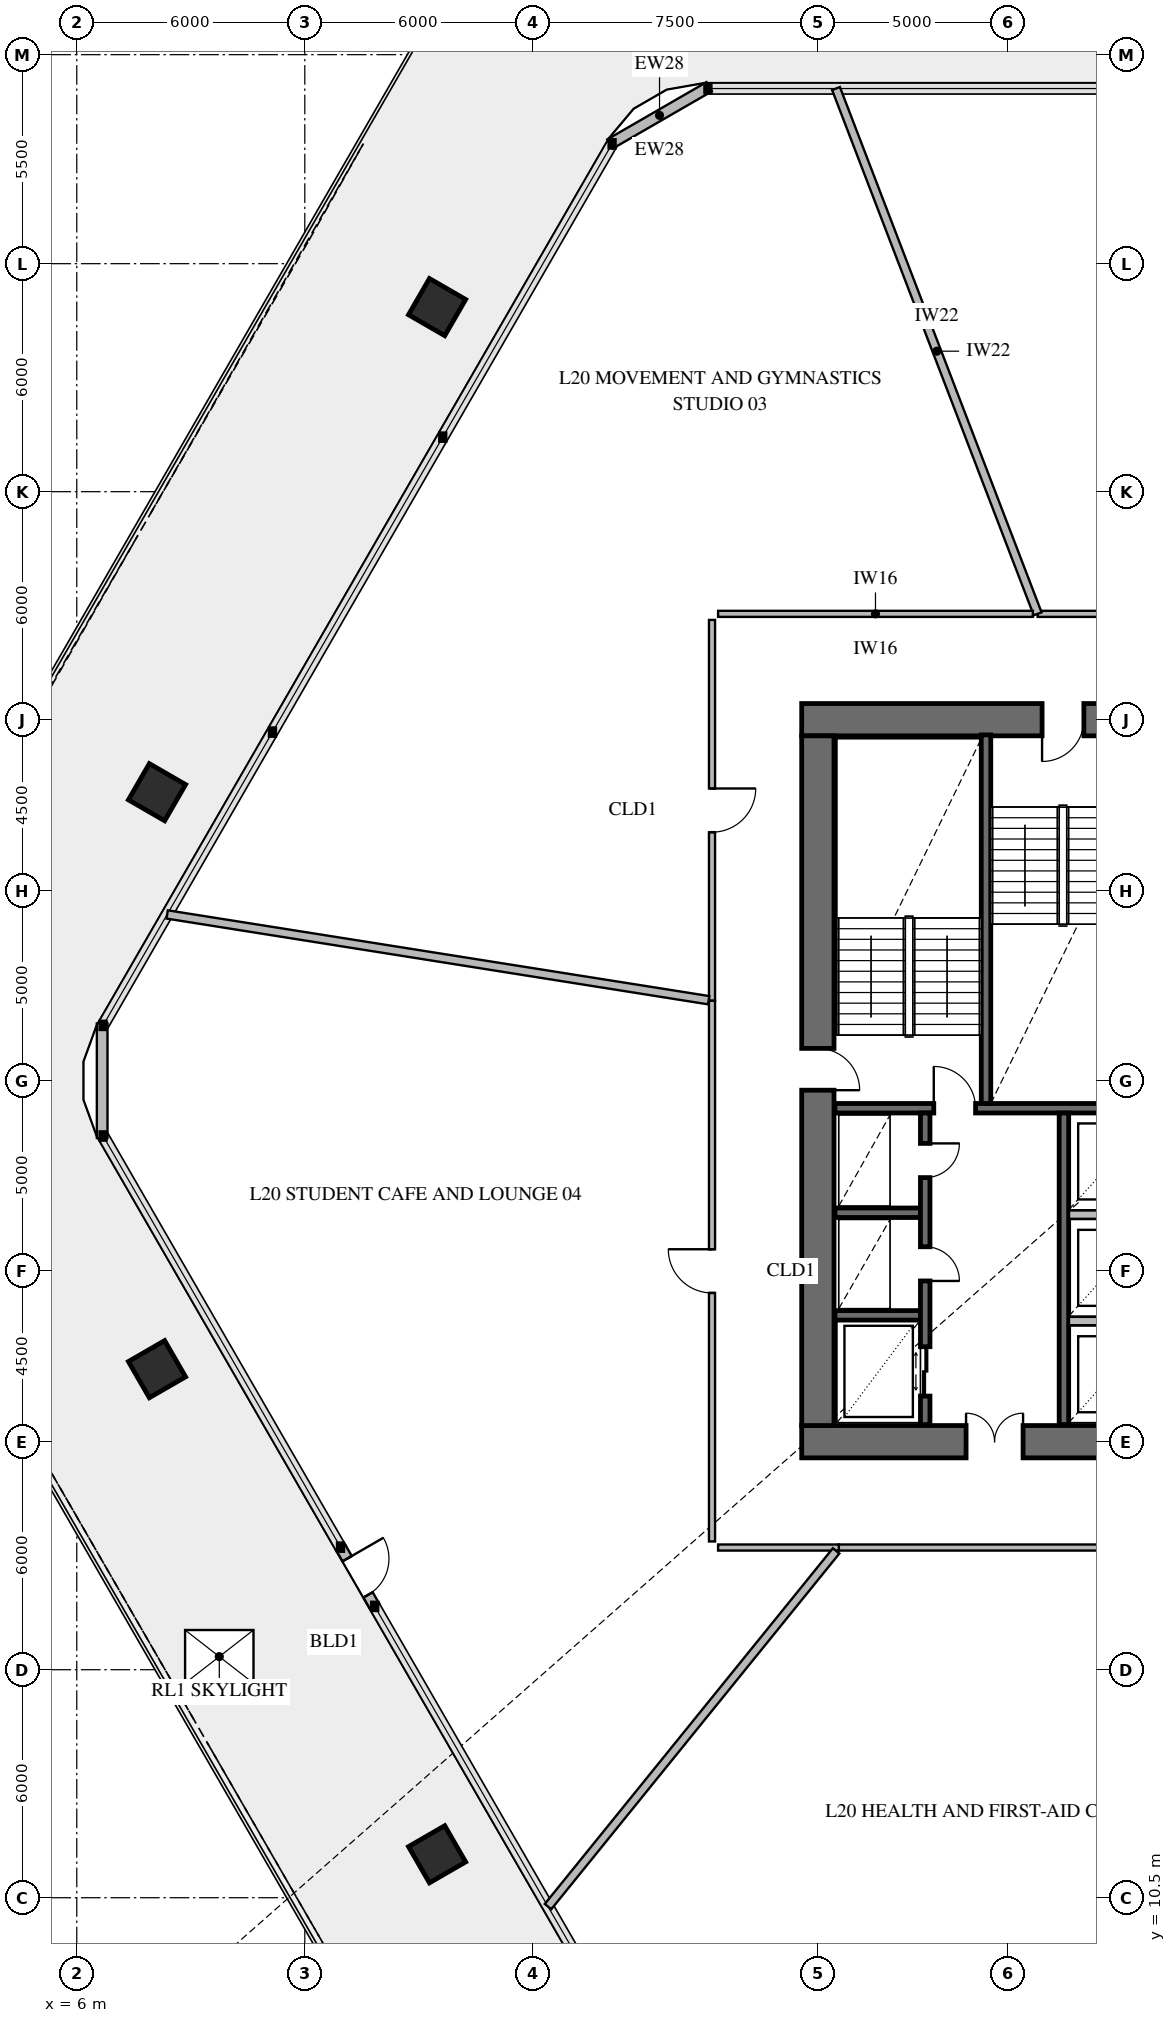
"""IFC4 building model, lengths in metres.
Left out: names, types, materials, properties, quantities, classifications, styles, units other than length and angle.
Written with IfcOpenShell. Run it as: python <this file> out.ifc"""

import sys

from ifc_helpers import new_model, si_unit, direction, frame, frame_2d, origin, origin_2d, place, context, subcontext, project, spatial, rectangle, extrude, element, fill, save


model = new_model("IFC4")
c1 = context("Model", 3, precision=1e-05, world=origin(), true_north=direction((0.0, 1.0)))
c2 = subcontext(c1, "Body", "Model", "MODEL_VIEW")
j1 = project(units=[si_unit("LENGTHUNIT", "METRE"), si_unit("PLANEANGLEUNIT", "RADIAN")], contexts=[c1])
p1 = place(None, origin())
s1 = spatial("IfcSite", under=j1, at=p1, CompositionType="ELEMENT")
p2 = place(p1, origin())
s2 = spatial("IfcBuilding", under=s1, at=p2, CompositionType="ELEMENT")
p3 = place(p2, frame((0.0, 0.0, 83.4)))
s3 = spatial("IfcBuildingStorey", under=s2, at=p3, CompositionType="ELEMENT", Elevation=83.4)
p4 = place(p3, frame((25.075, 22.5, 0.0), z_axis=(0.0, 0.0, 1.0), x_axis=(1.0, 0.0, 0.0)))
e1 = element("IfcWall", 1, at=p4, inside=s3, PredefinedType="SHEAR", context=c2, shape_type="SweptSolid", body=[
    extrude(rectangle(XDim=9.975, YDim=0.85, at=frame_2d((4.988, 0.0))), origin(), (0.0, 0.0, 1.0), 4.2),
])
p5 = place(p4, frame((4.325, 0.0, 0.0)))
e2 = element("IfcOpeningElement", 2, at=p5, cuts=e1, PredefinedType="OPENING", context=c2, shape_type="SweptSolid", body=[
    extrude(rectangle(XDim=1.5, YDim=2.15, at=frame_2d((0.75, 1.075))), frame((0.0, 0.437, 0.0), z_axis=(0.0, -1.0, 0.0), x_axis=(1.0, 0.0, 0.0)), (0.0, 0.0, 1.0), 0.874),
])
p6 = place(p3, frame((36.75, 41.5, 0.0), z_axis=(0.0, 0.0, 1.0), x_axis=(-1.0, 0.0, 0.0)))
e3 = element("IfcWall", 3, at=p6, inside=s3, PredefinedType="SHEAR", context=c2, shape_type="SweptSolid", body=[
    extrude(rectangle(XDim=11.675, YDim=0.85, at=frame_2d((5.837, 0.0))), origin(), (0.0, 0.0, 1.0), 4.2),
])
p7 = place(p6, frame((4.25, 0.0, 0.0)))
e4 = element("IfcOpeningElement", 4, at=p7, cuts=e3, PredefinedType="OPENING", context=c2, shape_type="SweptSolid", body=[
    extrude(rectangle(XDim=1.1, YDim=2.15, at=frame_2d((0.55, 1.075))), frame((0.0, 0.437, 0.0), z_axis=(0.0, -1.0, 0.0), x_axis=(1.0, 0.0, 0.0)), (0.0, 0.0, 1.0), 0.874),
])
p8 = place(p3, frame((25.5, 22.925, 0.0), z_axis=(0.0, 0.0, 1.0), x_axis=(0.0, 1.0, 0.0)))
e5 = element("IfcWall", 5, at=p8, inside=s3, PredefinedType="SHEAR", context=c2, shape_type="SweptSolid", body=[
    extrude(rectangle(XDim=18.15, YDim=0.85, at=frame_2d((9.075, 0.0))), origin(), (0.0, 0.0, 1.0), 4.2),
])
p9 = place(p8, frame((8.825, 0.0, 0.0)))
e6 = element("IfcOpeningElement", 6, at=p9, cuts=e5, PredefinedType="OPENING", context=c2, shape_type="SweptSolid", body=[
    extrude(rectangle(XDim=1.1, YDim=2.15, at=frame_2d((0.55, 1.075))), frame((0.0, 0.437, 0.0), z_axis=(0.0, -1.0, 0.0), x_axis=(1.0, 0.0, 0.0)), (0.0, 0.0, 1.0), 0.874),
])
for number, where, z_axis, x_axis in (
    (7, (15.481, 52.357, 0.0), (0.0, 0.0, 1.0), (-0.5, -0.866, 0.0)),
    (8, (8.111, 39.592, 0.0), (0.0, 0.0, 1.0), (-0.5, -0.866, 0.0)),
    (9, (8.111, 24.408, 0.0), (0.0, 0.0, 1.0), (0.5, -0.866, 0.0)),
    (10, (15.481, 11.643, 0.0), (0.0, 0.0, 1.0), (0.5, -0.866, 0.0)),
):
    element("IfcColumn", number, at=place(p3, frame(where, z_axis=z_axis, x_axis=x_axis)), inside=s3, PredefinedType="COLUMN", context=c2, shape_type="SweptSolid", body=[
        extrude(rectangle(XDim=1.1, YDim=1.1, at=origin_2d()), origin(), (0.0, 0.0, 1.0), 3.85),
    ])
p10 = place(p3, frame((13.837, 18.171, 0.0), z_axis=(0.0, 0.0, 1.0), x_axis=(-0.500041240653, 0.866001592173, 0.0)))
e11 = element("IfcWall", 11, at=p10, inside=s3, PredefinedType="SOLIDWALL", context=c2, shape_type="SweptSolid", body=[
    extrude(rectangle(XDim=1.79, YDim=0.28, at=frame_2d((0.895, 0.0))), origin(), (0.0, 0.0, 1.0), 3.85),
])
p11 = place(p10, frame((0.345, 0.0, 0.0)))
e12 = element("IfcOpeningElement", 12, at=p11, cuts=e11, PredefinedType="OPENING", context=c2, shape_type="SweptSolid", body=[
    extrude(rectangle(XDim=1.1, YDim=2.2, at=frame_2d((0.55, 1.1))), frame((0.0, 0.152, 0.0), z_axis=(0.0, -1.0, 0.0), x_axis=(1.0, 0.0, 0.0)), (0.0, 0.0, 1.0), 0.304),
])
for number, where, z_axis, x_axis in (
    (13, (6.668, 30.492, 0.0), (0.0, 0.0, 1.0), (0.0, 1.0, 0.0)),
    (14, (20.029, 56.648, 0.0), (0.0, 0.0, 1.0), (0.866, 0.5, 0.0)),
):
    element("IfcWall", number, at=place(p3, frame(where, z_axis=z_axis, x_axis=x_axis)), inside=s3, PredefinedType="SOLIDWALL", context=c2, shape_type="SweptSolid", body=[
        extrude(rectangle(XDim=3.015, YDim=0.28, at=frame_2d((1.508, 0.0))), origin(), (0.0, 0.0, 1.0), 3.85),
    ])
p12 = place(p3, frame((25.95, 31.275, 0.0), z_axis=(0.0, 0.0, 1.0), x_axis=(1.0, 0.0, 0.0)))
e15 = element("IfcWall", 15, at=p12, inside=s3, PredefinedType="SOLIDWALL", context=c2, shape_type="SweptSolid", body=[
    extrude(rectangle(XDim=20.1, YDim=0.25, at=frame_2d((10.05, 0.0))), origin(), (0.0, 0.0, 1.0), 4.2),
])
p13 = place(p12, frame((2.6, 0.0, 0.0)))
e16 = element("IfcOpeningElement", 16, at=p13, cuts=e15, PredefinedType="OPENING", context=c2, shape_type="SweptSolid", body=[
    extrude(rectangle(XDim=1.1, YDim=2.15, at=frame_2d((0.55, 1.075))), frame((0.0, 0.137, 0.0), z_axis=(0.0, -1.0, 0.0), x_axis=(1.0, 0.0, 0.0)), (0.0, 0.0, 1.0), 0.274),
])
p14 = place(p12, frame((10.6, 0.0, 0.0)))
e17 = element("IfcOpeningElement", 17, at=p14, cuts=e15, PredefinedType="OPENING", context=c2, shape_type="SweptSolid", body=[
    extrude(rectangle(XDim=1.1, YDim=2.15, at=frame_2d((0.55, 1.075))), frame((0.0, 0.137, 0.0), z_axis=(0.0, -1.0, 0.0), x_axis=(1.0, 0.0, 0.0)), (0.0, 0.0, 1.0), 0.274),
])
p15 = place(p12, frame((16.35, 0.0, 0.0)))
e18 = element("IfcOpeningElement", 18, at=p15, cuts=e15, PredefinedType="OPENING", context=c2, shape_type="SweptSolid", body=[
    extrude(rectangle(XDim=1.1, YDim=2.15, at=frame_2d((0.55, 1.075))), frame((0.0, 0.137, 0.0), z_axis=(0.0, -1.0, 0.0), x_axis=(1.0, 0.0, 0.0)), (0.0, 0.0, 1.0), 0.274),
])
p16 = place(p3, frame((29.925, 31.4, 0.0), z_axis=(0.0, 0.0, 1.0), x_axis=(0.0, 1.0, 0.0)))
e19 = element("IfcWall", 19, at=p16, inside=s3, PredefinedType="SOLIDWALL", context=c2, shape_type="SweptSolid", body=[
    extrude(rectangle(XDim=9.7, YDim=0.25, at=frame_2d((4.85, 0.0))), origin(), (0.0, 0.0, 1.0), 4.2),
])
for number, where, z_axis, x_axis in (
    (20, (25.95, 25.825, 0.0), (0.0, 0.0, 1.0), (1.0, 0.0, 0.0)),
    (21, (25.95, 28.525, 0.0), (0.0, 0.0, 1.0), (1.0, 0.0, 0.0)),
):
    element("IfcWall", number, at=place(p3, frame(where, z_axis=z_axis, x_axis=x_axis)), inside=s3, PredefinedType="SOLIDWALL", context=c2, shape_type="SweptSolid", body=[
        extrude(rectangle(XDim=2.25, YDim=0.25, at=frame_2d((1.125, 0.0))), origin(), (0.0, 0.0, 1.0), 4.2),
    ])
p17 = place(p3, frame((28.325, 22.95, 0.0), z_axis=(0.0, 0.0, 1.0), x_axis=(0.0, 1.0, 0.0)))
e22 = element("IfcWall", 22, at=p17, inside=s3, PredefinedType="SOLIDWALL", context=c2, shape_type="SweptSolid", body=[
    extrude(rectangle(XDim=8.2, YDim=0.25, at=frame_2d((4.1, 0.0))), origin(), (0.0, 0.0, 1.0), 4.2),
])
p18 = place(p17, frame((0.75, 0.0, 0.0)))
e23 = element("IfcOpeningElement", 23, at=p18, cuts=e22, PredefinedType="OPENING", context=c2, shape_type="SweptSolid", body=[
    extrude(rectangle(XDim=1.3, YDim=2.3, at=frame_2d((0.65, 1.15))), frame((0.0, 0.137, 0.0), z_axis=(0.0, -1.0, 0.0), x_axis=(1.0, 0.0, 0.0)), (0.0, 0.0, 1.0), 0.274),
])
p19 = place(p17, frame((3.78, 0.0, 0.0)))
e24 = element("IfcOpeningElement", 24, at=p19, cuts=e22, PredefinedType="OPENING", context=c2, shape_type="SweptSolid", body=[
    extrude(rectangle(XDim=0.9, YDim=2.1, at=frame_2d((0.45, 1.05))), frame((0.0, 0.137, 0.0), z_axis=(0.0, -1.0, 0.0), x_axis=(1.0, 0.0, 0.0)), (0.0, 0.0, 1.0), 0.274),
])
p20 = place(p17, frame((6.5, 0.0, 0.0)))
e25 = element("IfcOpeningElement", 25, at=p20, cuts=e22, PredefinedType="OPENING", context=c2, shape_type="SweptSolid", body=[
    extrude(rectangle(XDim=0.9, YDim=2.1, at=frame_2d((0.45, 1.05))), frame((0.0, 0.137, 0.0), z_axis=(0.0, -1.0, 0.0), x_axis=(1.0, 0.0, 0.0)), (0.0, 0.0, 1.0), 0.274),
])
p21 = place(p3, frame((31.975, 22.95, 0.0), z_axis=(0.0, 0.0, 1.0), x_axis=(0.0, 1.0, 0.0)))
e26 = element("IfcWall", 26, at=p21, inside=s3, PredefinedType="SOLIDWALL", context=c2, shape_type="SweptSolid", body=[
    extrude(rectangle(XDim=8.2, YDim=0.25, at=frame_2d((4.1, 0.0))), origin(), (0.0, 0.0, 1.0), 4.2),
])
p22 = place(p3, frame((49.125, 44.285, 0.0), z_axis=(0.0, 0.0, 1.0), x_axis=(-1.0, 0.0, 0.0)))
e27 = element("IfcWall", 27, at=p22, inside=s3, PredefinedType="PARTITIONING", context=c2, shape_type="SweptSolid", body=[
    extrude(rectangle(XDim=17.841, YDim=0.16, at=frame_2d((8.92, 0.0))), origin(), (0.0, 0.0, 1.0), 3.15),
])
p23 = place(p22, frame((8.17, 0.0, 0.0)))
e28 = element("IfcOpeningElement", 28, at=p23, cuts=e27, PredefinedType="OPENING", context=c2, shape_type="SweptSolid", body=[
    extrude(rectangle(XDim=1.5, YDim=2.15, at=frame_2d((0.75, 1.075))), frame((0.0, 0.092, 0.0), z_axis=(0.0, -1.0, 0.0), x_axis=(1.0, 0.0, 0.0)), (0.0, 0.0, 1.0), 0.184),
])
p24 = place(p3, frame((22.715, 44.125, 0.0), z_axis=(0.0, 0.0, 1.0), x_axis=(0.0, -1.0, 0.0)))
e29 = element("IfcWall", 29, at=p24, inside=s3, PredefinedType="PARTITIONING", context=c2, shape_type="SweptSolid", body=[
    extrude(rectangle(XDim=10.021, YDim=0.16, at=frame_2d((5.01, 0.0))), origin(), (0.0, 0.0, 1.0), 3.15),
])
p25 = place(p24, frame((4.435, 0.0, 0.0)))
e30 = element("IfcOpeningElement", 30, at=p25, cuts=e29, PredefinedType="OPENING", context=c2, shape_type="SweptSolid", body=[
    extrude(rectangle(XDim=1.15, YDim=2.2, at=frame_2d((0.575, 1.1))), frame((0.0, 0.092, 0.0), z_axis=(0.0, -1.0, 0.0), x_axis=(1.0, 0.0, 0.0)), (0.0, 0.0, 1.0), 0.184),
])
p26 = place(p3, frame((22.715, 34.104, 0.0), z_axis=(0.0, 0.0, 1.0), x_axis=(0.0, -1.0, 0.0)))
e31 = element("IfcWall", 31, at=p26, inside=s3, PredefinedType="PARTITIONING", context=c2, shape_type="SweptSolid", body=[
    extrude(rectangle(XDim=14.229, YDim=0.16, at=frame_2d((7.115, 0.0))), origin(), (0.0, 0.0, 1.0), 3.15),
])
p27 = place(p26, frame((6.54, 0.0, 0.0)))
e32 = element("IfcOpeningElement", 32, at=p27, cuts=e31, PredefinedType="OPENING", context=c2, shape_type="SweptSolid", body=[
    extrude(rectangle(XDim=1.15, YDim=2.2, at=frame_2d((0.575, 1.1))), frame((0.0, 0.092, 0.0), z_axis=(0.0, -1.0, 0.0), x_axis=(1.0, 0.0, 0.0)), (0.0, 0.0, 1.0), 0.184),
])
p28 = place(p3, frame((26.052, 19.715, 0.0), z_axis=(0.0, 0.0, 1.0), x_axis=(1.0, 0.0, 0.0)))
e33 = element("IfcWall", 33, at=p28, inside=s3, PredefinedType="PARTITIONING", context=c2, shape_type="SweptSolid", body=[
    extrude(rectangle(XDim=17.926, YDim=0.16, at=frame_2d((8.963, 0.0))), origin(), (0.0, 0.0, 1.0), 3.15),
])
p29 = place(p28, frame((8.488, 0.0, 0.0)))
e34 = element("IfcOpeningElement", 34, at=p29, cuts=e33, PredefinedType="OPENING", context=c2, shape_type="SweptSolid", body=[
    extrude(rectangle(XDim=0.95, YDim=2.1, at=frame_2d((0.475, 1.05))), frame((0.0, 0.092, 0.0), z_axis=(0.0, -1.0, 0.0), x_axis=(1.0, 0.0, 0.0)), (0.0, 0.0, 1.0), 0.184),
])
for number, where, z_axis, x_axis in (
    (35, (32.108, 25.675, 0.0), (0.0, 0.0, 1.0), (1.0, 0.0, 0.0)),
    (36, (32.108, 28.475, 0.0), (0.0, 0.0, 1.0), (1.0, 0.0, 0.0)),
):
    element("IfcWall", number, at=place(p3, frame(where, z_axis=z_axis, x_axis=x_axis)), inside=s3, PredefinedType="PARTITIONING", context=c2, shape_type="SweptSolid", body=[
        extrude(rectangle(XDim=2.284, YDim=0.22, at=frame_2d((1.142, 0.0))), origin(), (0.0, 0.0, 1.0), 3.85),
    ])
p30 = place(p3, frame((31.284, 44.285, 0.0), z_axis=(0.0, 0.0, 1.0), x_axis=(-0.358376835574, 0.933577015422, 0.0)))
e37 = element("IfcWall", 37, at=p30, inside=s3, PredefinedType="PARTITIONING", context=c2, shape_type="SweptSolid", body=[
    extrude(rectangle(XDim=14.807, YDim=0.22, at=frame_2d((7.403, 0.0))), origin(), (0.0, 0.0, 1.0), 3.4),
])
p31 = place(p3, frame((31.158, 44.285, 0.0), z_axis=(0.0, 0.0, 1.0), x_axis=(-1.0, 0.0, 0.0)))
e38 = element("IfcWall", 38, at=p31, inside=s3, PredefinedType="PARTITIONING", context=c2, shape_type="SweptSolid", body=[
    extrude(rectangle(XDim=8.283, YDim=0.16, at=frame_2d((4.141, 0.0))), origin(), (0.0, 0.0, 1.0), 3.15),
])
p32 = place(p3, frame((22.627, 34.118, 0.0), z_axis=(0.0, 0.0, 1.0), x_axis=(-0.987689994957, 0.156424019454, 0.0)))
e39 = element("IfcWall", 39, at=p32, inside=s3, PredefinedType="PARTITIONING", context=c2, shape_type="SweptSolid", body=[
    extrude(rectangle(XDim=14.426, YDim=0.22, at=frame_2d((7.213, 0.0))), origin(), (0.0, 0.0, 1.0), 3.4),
])
p33 = place(p3, frame((22.875, 19.715, 0.0), z_axis=(0.0, 0.0, 1.0), x_axis=(1.0, 0.0, 0.0)))
e40 = element("IfcWall", 40, at=p33, inside=s3, PredefinedType="PARTITIONING", context=c2, shape_type="SweptSolid", body=[
    extrude(rectangle(XDim=3.177, YDim=0.16, at=frame_2d((1.588, 0.0))), origin(), (0.0, 0.0, 1.0), 3.15),
])
p34 = place(p3, frame((25.98, 19.627, 0.0), z_axis=(0.0, 0.0, 1.0), x_axis=(-0.629321252665, -0.777145263734, 0.0)))
e41 = element("IfcWall", 41, at=p34, inside=s3, PredefinedType="PARTITIONING", context=c2, shape_type="SweptSolid", body=[
    extrude(rectangle(XDim=12.045, YDim=0.22, at=frame_2d((6.022, 0.0))), origin(), (0.0, 0.0, 1.0), 3.4),
])
p35 = place(p11, frame((1.1, 0.0, 0.0), z_axis=(0.0, 0.0, 1.0), x_axis=(-1.0, 0.0, 0.0)))
e42 = element("IfcDoor", 42, at=p35, inside=s3, OperationType="SINGLE_SWING_LEFT", PredefinedType="DOOR", context=c2, shape_type="SweptSolid", body=[
    extrude(rectangle(XDim=1.1, YDim=2.2, at=frame_2d((0.55, 1.1))), frame((0.0, 0.025, 0.0), z_axis=(0.0, -1.0, 0.0), x_axis=(1.0, 0.0, 0.0)), (0.0, 0.0, 1.0), 0.05),
])
fill(e12, e42)
p36 = place(p3, frame((0.0, 0.0, -0.26)))
p37 = place(p36, frame((9.75, 16.844, 0.0)))
p38 = place(p37, frame((0.0, 0.0, 0.21)))
e43 = element("IfcWindow", 43, at=p38, inside=s3, PartitioningType="SINGLE_PANEL", PredefinedType="SKYLIGHT", context=c2, shape_type="SweptSolid", body=[
    extrude(rectangle(XDim=1.8, YDim=1.4, at=origin_2d()), origin(), (0.0, 0.0, 1.0), 0.05),
])
p39 = place(p9, frame((1.1, 0.0, 0.0), z_axis=(0.0, 0.0, 1.0), x_axis=(-1.0, 0.0, 0.0)))
e44 = element("IfcDoor", 44, at=p39, inside=s3, OperationType="SINGLE_SWING_RIGHT", PredefinedType="USERDEFINED", context=c2, shape_type="SweptSolid", body=[
    extrude(rectangle(XDim=1.1, YDim=2.15, at=frame_2d((0.55, 1.075))), frame((0.0, 0.025, 0.0), z_axis=(0.0, -1.0, 0.0), x_axis=(1.0, 0.0, 0.0)), (0.0, 0.0, 1.0), 0.05),
])
fill(e6, e44)
p40 = place(p7, origin())
e45 = element("IfcDoor", 45, at=p40, inside=s3, OperationType="SINGLE_SWING_RIGHT", PredefinedType="USERDEFINED", context=c2, shape_type="SweptSolid", body=[
    extrude(rectangle(XDim=1.1, YDim=2.15, at=frame_2d((0.55, 1.075))), frame((0.0, 0.025, 0.0), z_axis=(0.0, -1.0, 0.0), x_axis=(1.0, 0.0, 0.0)), (0.0, 0.0, 1.0), 0.05),
])
fill(e4, e45)
p41 = place(p5, origin())
e46 = element("IfcDoor", 46, at=p41, inside=s3, OperationType="DOUBLE_DOOR_SINGLE_SWING", PredefinedType="DOOR", context=c2, shape_type="SweptSolid", body=[
    extrude(rectangle(XDim=1.5, YDim=2.15, at=frame_2d((0.75, 1.075))), frame((0.0, 0.025, 0.0), z_axis=(0.0, -1.0, 0.0), x_axis=(1.0, 0.0, 0.0)), (0.0, 0.0, 1.0), 0.05),
])
fill(e2, e46)
p42 = place(p13, origin())
e47 = element("IfcDoor", 47, at=p42, inside=s3, OperationType="SINGLE_SWING_LEFT", PredefinedType="USERDEFINED", context=c2, shape_type="SweptSolid", body=[
    extrude(rectangle(XDim=1.1, YDim=2.15, at=frame_2d((0.55, 1.075))), frame((0.0, 0.025, 0.0), z_axis=(0.0, -1.0, 0.0), x_axis=(1.0, 0.0, 0.0)), (0.0, 0.0, 1.0), 0.05),
])
fill(e16, e47)
p43 = place(p18, frame((1.3, 0.0, 0.0), z_axis=(0.0, 0.0, 1.0), x_axis=(-1.0, 0.0, 0.0)))
e48 = element("IfcDoor", 48, at=p43, inside=s3, OperationType="DOUBLE_DOOR_SLIDING", PredefinedType="DOOR", context=c2, shape_type="SweptSolid", body=[
    extrude(rectangle(XDim=1.3, YDim=2.3, at=frame_2d((0.65, 1.15))), frame((0.0, 0.025, 0.0), z_axis=(0.0, -1.0, 0.0), x_axis=(1.0, 0.0, 0.0)), (0.0, 0.0, 1.0), 0.05),
])
fill(e23, e48)
p44 = place(p19, frame((0.9, 0.0, 0.0), z_axis=(0.0, 0.0, 1.0), x_axis=(-1.0, 0.0, 0.0)))
e49 = element("IfcDoor", 49, at=p44, inside=s3, OperationType="SINGLE_SWING_RIGHT", PredefinedType="DOOR", context=c2, shape_type="SweptSolid", body=[
    extrude(rectangle(XDim=0.9, YDim=2.1, at=frame_2d((0.45, 1.05))), frame((0.0, 0.025, 0.0), z_axis=(0.0, -1.0, 0.0), x_axis=(1.0, 0.0, 0.0)), (0.0, 0.0, 1.0), 0.05),
])
fill(e24, e49)
p45 = place(p20, frame((0.9, 0.0, 0.0), z_axis=(0.0, 0.0, 1.0), x_axis=(-1.0, 0.0, 0.0)))
e50 = element("IfcDoor", 50, at=p45, inside=s3, OperationType="SINGLE_SWING_LEFT", PredefinedType="DOOR", context=c2, shape_type="SweptSolid", body=[
    extrude(rectangle(XDim=0.9, YDim=2.1, at=frame_2d((0.45, 1.05))), frame((0.0, 0.025, 0.0), z_axis=(0.0, -1.0, 0.0), x_axis=(1.0, 0.0, 0.0)), (0.0, 0.0, 1.0), 0.05),
])
fill(e25, e50)
p46 = place(p25, origin())
e51 = element("IfcDoor", 51, at=p46, inside=s3, OperationType="SINGLE_SWING_LEFT", PredefinedType="DOOR", context=c2, shape_type="SweptSolid", body=[
    extrude(rectangle(XDim=1.15, YDim=2.2, at=frame_2d((0.575, 1.1))), frame((0.0, 0.025, 0.0), z_axis=(0.0, -1.0, 0.0), x_axis=(1.0, 0.0, 0.0)), (0.0, 0.0, 1.0), 0.05),
])
fill(e30, e51)
p47 = place(p27, frame((1.15, 0.0, 0.0), z_axis=(0.0, 0.0, 1.0), x_axis=(-1.0, 0.0, 0.0)))
e52 = element("IfcDoor", 52, at=p47, inside=s3, OperationType="SINGLE_SWING_RIGHT", PredefinedType="DOOR", context=c2, shape_type="SweptSolid", body=[
    extrude(rectangle(XDim=1.15, YDim=2.2, at=frame_2d((0.575, 1.1))), frame((0.0, 0.025, 0.0), z_axis=(0.0, -1.0, 0.0), x_axis=(1.0, 0.0, 0.0)), (0.0, 0.0, 1.0), 0.05),
])
fill(e32, e52)
save(model, sys.argv[1])
